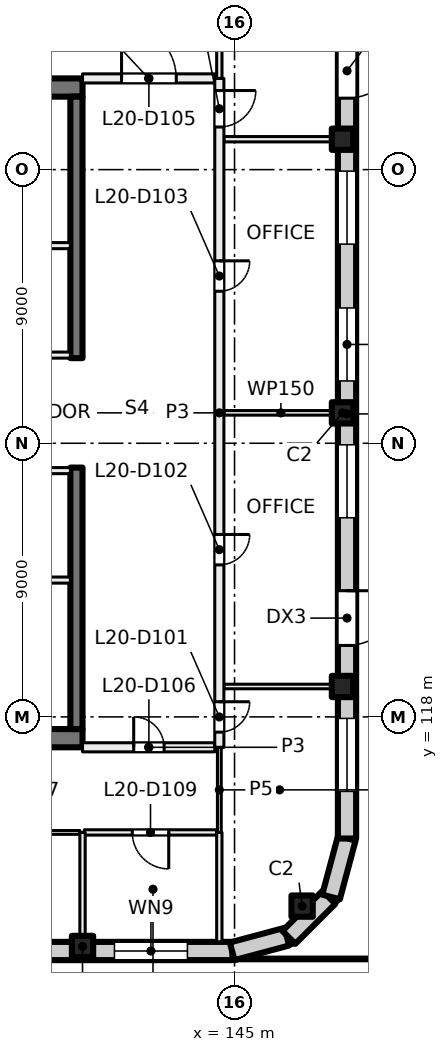
"""IFC4 building model, lengths in metres.
Left out: names, types, materials, properties, quantities, classifications, styles, units other than length and angle.
Written with IfcOpenShell. Run it as: python <this file> out.ifc"""

import sys

from ifc_helpers import new_model, si_unit, direction, frame, frame_2d, origin, origin_2d, place, context, subcontext, project, spatial, rectangle, extrude, element, fill, save


model = new_model("IFC4")
c1 = context("Model", 3, precision=1e-05, world=origin(), true_north=direction((0.0, 1.0)))
c2 = subcontext(c1, "Body", "Model", "MODEL_VIEW")
j1 = project(units=[si_unit("LENGTHUNIT", "METRE"), si_unit("PLANEANGLEUNIT", "RADIAN")], contexts=[c1])
p1 = place(None, origin())
s1 = spatial("IfcSite", under=j1, at=p1, CompositionType="ELEMENT")
p2 = place(p1, origin())
s2 = spatial("IfcBuilding", under=s1, at=p2, CompositionType="ELEMENT")
p3 = place(p2, frame((0.0, 0.0, 89.0)))
s3 = spatial("IfcBuildingStorey", under=s2, at=p3, CompositionType="ELEMENT", Elevation=89.0)
for number, where, z_axis, x_axis in (
    (1, (148.55, 119.0, 0.0), (0.0, 0.0, 1.0), (1.0, 0.0, 0.0)),
    (2, (148.55, 128.0, 0.0), (0.0, 0.0, 1.0), (1.0, 0.0, 0.0)),
    (3, (148.55, 137.0, 0.0), (0.0, 0.0, 1.0), (1.0, 0.0, 0.0)),
    (4, (140.0, 110.45, 0.0), (0.0, 0.0, 1.0), (1.0, 0.0, 0.0)),
    (5, (147.223, 111.777, 0.0), (0.0, 0.0, 1.0), (1.0, 0.0, 0.0)),
):
    element("IfcColumn", number, at=place(p3, frame(where, z_axis=z_axis, x_axis=x_axis)), inside=s3, PredefinedType="COLUMN", context=c2, shape_type="SweptSolid", body=[
        extrude(rectangle(XDim=0.7, YDim=0.7, at=origin_2d()), origin(), (0.0, 0.0, 1.0), 4.0),
    ])
for number, where, z_axis, x_axis in (
    (6, (135.4, 117.3, 0.0), (0.0, 0.0, 1.0), (1.0, 0.0, 0.0)),
    (7, (135.4, 138.7, 0.0), (0.0, 0.0, 1.0), (1.0, 0.0, 0.0)),
):
    element("IfcWall", number, at=place(p3, frame(where, z_axis=z_axis, x_axis=x_axis)), inside=s3, PredefinedType="SHEAR", context=c2, shape_type="SweptSolid", body=[
        extrude(rectangle(XDim=4.6, YDim=0.6, at=frame_2d((2.3, 0.0))), origin(), (0.0, 0.0, 1.0), 4.0),
    ])
for number, where, z_axis, x_axis in (
    (8, (139.8, 117.6, 0.0), (0.0, 0.0, 1.0), (0.0, 1.0, 0.0)),
    (9, (139.8, 129.8, 0.0), (0.0, 0.0, 1.0), (0.0, 1.0, 0.0)),
):
    element("IfcWall", number, at=place(p3, frame(where, z_axis=z_axis, x_axis=x_axis)), inside=s3, PredefinedType="SHEAR", context=c2, shape_type="SweptSolid", body=[
        extrude(rectangle(XDim=8.6, YDim=0.4, at=frame_2d((4.3, 0.0))), origin(), (0.0, 0.0, 1.0), 4.0),
    ])
p4 = place(p3, frame((144.93, 110.3, 0.0), z_axis=(0.0, 0.0, 1.0), x_axis=(-1.0, 0.0, 0.0)))
e10 = element("IfcWall", 10, at=p4, inside=s3, PredefinedType="SOLIDWALL", context=c2, shape_type="SweptSolid", body=[
    extrude(rectangle(XDim=13.93, YDim=0.6, at=frame_2d((6.965, 0.0))), origin(), (0.0, 0.0, 1.0), 3.625),
])
p5 = place(p4, frame((1.48, 0.0, 0.9)))
e11 = element("IfcOpeningElement", 11, at=p5, cuts=e10, PredefinedType="OPENING", context=c2, shape_type="SweptSolid", body=[
    extrude(rectangle(XDim=2.4, YDim=2.4, at=frame_2d((1.2, 1.2))), frame((0.0, 0.31, 0.0), z_axis=(0.0, -1.0, 0.0), x_axis=(1.0, 0.0, 0.0)), (0.0, 0.0, 1.0), 0.62),
])
p6 = place(p4, frame((5.98, 0.0, 0.9)))
e12 = element("IfcOpeningElement", 12, at=p6, cuts=e10, PredefinedType="OPENING", context=c2, shape_type="SweptSolid", body=[
    extrude(rectangle(XDim=2.4, YDim=2.4, at=frame_2d((1.2, 1.2))), frame((0.0, 0.31, 0.0), z_axis=(0.0, -1.0, 0.0), x_axis=(1.0, 0.0, 0.0)), (0.0, 0.0, 1.0), 0.62),
])
p7 = place(p4, frame((10.48, 0.0, 0.9)))
e13 = element("IfcOpeningElement", 13, at=p7, cuts=e10, PredefinedType="OPENING", context=c2, shape_type="SweptSolid", body=[
    extrude(rectangle(XDim=2.4, YDim=2.4, at=frame_2d((1.2, 1.2))), frame((0.0, 0.31, 0.0), z_axis=(0.0, -1.0, 0.0), x_axis=(1.0, 0.0, 0.0)), (0.0, 0.0, 1.0), 0.62),
])
for number, where, z_axis, x_axis in (
    (14, (146.719, 110.771, 0.0), (0.0, 0.0, 1.0), (-0.966, -0.259, 0.0)),
    (15, (148.104, 112.064, 0.0), (0.0, 0.0, 1.0), (-0.707, -0.707, 0.0)),
):
    element("IfcWall", number, at=place(p3, frame(where, z_axis=z_axis, x_axis=x_axis)), inside=s3, PredefinedType="SOLIDWALL", context=c2, shape_type="SweptSolid", body=[
        extrude(rectangle(XDim=1.861, YDim=0.6, at=frame_2d((0.93, 0.0))), origin(), (0.0, 0.0, 1.0), 3.625),
    ])
p8 = place(p3, frame((148.692, 114.01, 0.0), z_axis=(0.0, 0.0, 1.0), x_axis=(-0.258839784042, -0.965920269068, 0.0)))
e16 = element("IfcWall", 16, at=p8, inside=s3, PredefinedType="SOLIDWALL", context=c2, shape_type="SweptSolid", body=[
    extrude(rectangle(XDim=2.0, YDim=0.6, at=frame_2d((1.0, 0.0))), origin(), (0.0, 0.0, 1.0), 3.625),
])
p9 = place(p3, frame((148.7, 141.93, 0.0), z_axis=(0.0, 0.0, 1.0), x_axis=(0.0, -1.0, 0.0)))
e17 = element("IfcWall", 17, at=p9, inside=s3, PredefinedType="SOLIDWALL", context=c2, shape_type="SweptSolid", body=[
    extrude(rectangle(XDim=27.93, YDim=0.6, at=frame_2d((13.965, 0.0))), origin(), (0.0, 0.0, 1.0), 3.625),
])
p10 = place(p9, frame((1.78, 0.0, 0.0)))
e18 = element("IfcOpeningElement", 18, at=p10, cuts=e17, PredefinedType="OPENING", context=c2, shape_type="SweptSolid", body=[
    extrude(rectangle(XDim=1.8, YDim=2.4, at=frame_2d((0.9, 1.2))), frame((0.0, 0.31, 0.0), z_axis=(0.0, -1.0, 0.0), x_axis=(1.0, 0.0, 0.0)), (0.0, 0.0, 1.0), 0.62),
])
p11 = place(p9, frame((5.98, 0.0, 0.9)))
e19 = element("IfcOpeningElement", 19, at=p11, cuts=e17, PredefinedType="OPENING", context=c2, shape_type="SweptSolid", body=[
    extrude(rectangle(XDim=2.4, YDim=2.4, at=frame_2d((1.2, 1.2))), frame((0.0, 0.31, 0.0), z_axis=(0.0, -1.0, 0.0), x_axis=(1.0, 0.0, 0.0)), (0.0, 0.0, 1.0), 0.62),
])
p12 = place(p9, frame((10.48, 0.0, 0.9)))
e20 = element("IfcOpeningElement", 20, at=p12, cuts=e17, PredefinedType="OPENING", context=c2, shape_type="SweptSolid", body=[
    extrude(rectangle(XDim=2.4, YDim=2.4, at=frame_2d((1.2, 1.2))), frame((0.0, 0.31, 0.0), z_axis=(0.0, -1.0, 0.0), x_axis=(1.0, 0.0, 0.0)), (0.0, 0.0, 1.0), 0.62),
])
p13 = place(p9, frame((14.98, 0.0, 0.9)))
e21 = element("IfcOpeningElement", 21, at=p13, cuts=e17, PredefinedType="OPENING", context=c2, shape_type="SweptSolid", body=[
    extrude(rectangle(XDim=2.4, YDim=2.4, at=frame_2d((1.2, 1.2))), frame((0.0, 0.31, 0.0), z_axis=(0.0, -1.0, 0.0), x_axis=(1.0, 0.0, 0.0)), (0.0, 0.0, 1.0), 0.62),
])
p14 = place(p9, frame((19.78, 0.0, 0.0)))
e22 = element("IfcOpeningElement", 22, at=p14, cuts=e17, PredefinedType="OPENING", context=c2, shape_type="SweptSolid", body=[
    extrude(rectangle(XDim=1.8, YDim=2.4, at=frame_2d((0.9, 1.2))), frame((0.0, 0.31, 0.0), z_axis=(0.0, -1.0, 0.0), x_axis=(1.0, 0.0, 0.0)), (0.0, 0.0, 1.0), 0.62),
])
p15 = place(p9, frame((23.98, 0.0, 0.9)))
e23 = element("IfcOpeningElement", 23, at=p15, cuts=e17, PredefinedType="OPENING", context=c2, shape_type="SweptSolid", body=[
    extrude(rectangle(XDim=2.4, YDim=2.4, at=frame_2d((1.2, 1.2))), frame((0.0, 0.31, 0.0), z_axis=(0.0, -1.0, 0.0), x_axis=(1.0, 0.0, 0.0)), (0.0, 0.0, 1.0), 0.62),
])
p16 = place(p3, frame((135.0, 129.9, 0.0), z_axis=(0.0, 0.0, 1.0), x_axis=(1.0, 0.0, 0.0)))
e24 = element("IfcWall", 24, at=p16, inside=s3, PredefinedType="PARTITIONING", context=c2, shape_type="SweptSolid", body=[
    extrude(rectangle(XDim=4.6, YDim=0.2, at=frame_2d((2.3, 0.0))), origin(), (0.0, 0.0, 1.0), 3.625),
])
p17 = place(p16, frame((1.7, 0.0, 0.0)))
e25 = element("IfcOpeningElement", 25, at=p17, cuts=e24, PredefinedType="OPENING", context=c2, shape_type="SweptSolid", body=[
    extrude(rectangle(XDim=1.2, YDim=2.1, at=frame_2d((0.6, 1.05))), frame((0.0, 0.11, 0.0), z_axis=(0.0, -1.0, 0.0), x_axis=(1.0, 0.0, 0.0)), (0.0, 0.0, 1.0), 0.22),
])
p18 = place(p3, frame((135.0, 133.5, 0.0), z_axis=(0.0, 0.0, 1.0), x_axis=(1.0, 0.0, 0.0)))
e26 = element("IfcWall", 26, at=p18, inside=s3, PredefinedType="PARTITIONING", context=c2, shape_type="SweptSolid", body=[
    extrude(rectangle(XDim=4.6, YDim=0.2, at=frame_2d((2.3, 0.0))), origin(), (0.0, 0.0, 1.0), 3.625),
])
p19 = place(p18, frame((1.75, 0.0, 0.0)))
e27 = element("IfcOpeningElement", 27, at=p19, cuts=e26, PredefinedType="OPENING", context=c2, shape_type="SweptSolid", body=[
    extrude(rectangle(XDim=1.5, YDim=2.1, at=frame_2d((0.75, 1.05))), frame((0.0, 0.11, 0.0), z_axis=(0.0, -1.0, 0.0), x_axis=(1.0, 0.0, 0.0)), (0.0, 0.0, 1.0), 0.22),
])
p20 = place(p3, frame((139.6, 126.1, 0.0), z_axis=(0.0, 0.0, 1.0), x_axis=(-1.0, 0.0, 0.0)))
e28 = element("IfcWall", 28, at=p20, inside=s3, PredefinedType="PARTITIONING", context=c2, shape_type="SweptSolid", body=[
    extrude(rectangle(XDim=4.6, YDim=0.2, at=frame_2d((2.3, 0.0))), origin(), (0.0, 0.0, 1.0), 3.625),
])
p21 = place(p20, frame((1.7, 0.0, 0.0)))
e29 = element("IfcOpeningElement", 29, at=p21, cuts=e28, PredefinedType="OPENING", context=c2, shape_type="SweptSolid", body=[
    extrude(rectangle(XDim=1.2, YDim=2.1, at=frame_2d((0.6, 1.05))), frame((0.0, 0.11, 0.0), z_axis=(0.0, -1.0, 0.0), x_axis=(1.0, 0.0, 0.0)), (0.0, 0.0, 1.0), 0.22),
])
p22 = place(p3, frame((139.6, 122.5, 0.0), z_axis=(0.0, 0.0, 1.0), x_axis=(-1.0, 0.0, 0.0)))
e30 = element("IfcWall", 30, at=p22, inside=s3, PredefinedType="PARTITIONING", context=c2, shape_type="SweptSolid", body=[
    extrude(rectangle(XDim=4.6, YDim=0.2, at=frame_2d((2.3, 0.0))), origin(), (0.0, 0.0, 1.0), 3.625),
])
p23 = place(p22, frame((1.35, 0.0, 0.0)))
e31 = element("IfcOpeningElement", 31, at=p23, cuts=e30, PredefinedType="OPENING", context=c2, shape_type="SweptSolid", body=[
    extrude(rectangle(XDim=1.5, YDim=2.1, at=frame_2d((0.75, 1.05))), frame((0.0, 0.11, 0.0), z_axis=(0.0, -1.0, 0.0), x_axis=(1.0, 0.0, 0.0)), (0.0, 0.0, 1.0), 0.22),
])
p24 = place(p3, frame((139.916, 114.2, 0.0), z_axis=(0.0, 0.0, 1.0), x_axis=(-1.0, 0.0, 0.0)))
e32 = element("IfcWall", 32, at=p24, inside=s3, PredefinedType="PARTITIONING", context=c2, shape_type="SweptSolid", body=[
    extrude(rectangle(XDim=8.919, YDim=0.125, at=frame_2d((4.459, 0.0))), origin(), (0.0, 0.0, 1.0), 3.625),
])
p25 = place(p24, frame((1.698, 0.0, 0.0)))
e33 = element("IfcOpeningElement", 33, at=p25, cuts=e32, PredefinedType="OPENING", context=c2, shape_type="SweptSolid", body=[
    extrude(rectangle(XDim=1.0, YDim=2.1, at=frame_2d((0.5, 1.05))), frame((0.0, 0.073, 0.0), z_axis=(0.0, -1.0, 0.0), x_axis=(1.0, 0.0, 0.0)), (0.0, 0.0, 1.0), 0.145),
])
p26 = place(p24, frame((6.266, 0.0, 0.0)))
e34 = element("IfcOpeningElement", 34, at=p26, cuts=e32, PredefinedType="OPENING", context=c2, shape_type="SweptSolid", body=[
    extrude(rectangle(XDim=0.8, YDim=2.1, at=frame_2d((0.4, 1.05))), frame((0.0, 0.073, 0.0), z_axis=(0.0, -1.0, 0.0), x_axis=(1.0, 0.0, 0.0)), (0.0, 0.0, 1.0), 0.145),
])
p27 = place(p3, frame((144.412, 114.2, 0.0), z_axis=(0.0, 0.0, 1.0), x_axis=(-1.0, 0.0, 0.0)))
e35 = element("IfcWall", 35, at=p27, inside=s3, PredefinedType="PARTITIONING", context=c2, shape_type="SweptSolid", body=[
    extrude(rectangle(XDim=4.352, YDim=0.175, at=frame_2d((2.176, 0.0))), origin(), (0.0, 0.0, 1.0), 3.625),
])
p28 = place(p27, frame((1.576, 0.0, 0.0)))
e36 = element("IfcOpeningElement", 36, at=p28, cuts=e35, PredefinedType="OPENING", context=c2, shape_type="SweptSolid", body=[
    extrude(rectangle(XDim=1.2, YDim=2.1, at=frame_2d((0.6, 1.05))), frame((0.0, 0.097, 0.0), z_axis=(0.0, -1.0, 0.0), x_axis=(1.0, 0.0, 0.0)), (0.0, 0.0, 1.0), 0.195),
])
p29 = place(p3, frame((140.0, 110.6, 0.0), z_axis=(0.0, 0.0, 1.0), x_axis=(0.0, 1.0, 0.0)))
e37 = element("IfcWall", 37, at=p29, inside=s3, PredefinedType="PARTITIONING", context=c2, shape_type="SweptSolid", body=[
    extrude(rectangle(XDim=3.6, YDim=0.175, at=frame_2d((1.8, 0.0))), origin(), (0.0, 0.0, 1.0), 3.625),
])
p30 = place(p3, frame((140.0, 139.0, 0.0), z_axis=(0.0, 0.0, 1.0), x_axis=(1.0, 0.0, 0.0)))
e38 = element("IfcWall", 38, at=p30, inside=s3, PredefinedType="PARTITIONING", context=c2, shape_type="SweptSolid", body=[
    extrude(rectangle(XDim=4.35, YDim=0.3, at=frame_2d((2.175, 0.0))), origin(), (0.0, 0.0, 1.0), 3.625),
])
p31 = place(p30, frame((1.283, 0.0, 0.0)))
e39 = element("IfcOpeningElement", 39, at=p31, cuts=e38, PredefinedType="OPENING", context=c2, shape_type="SweptSolid", body=[
    extrude(rectangle(XDim=1.8, YDim=2.1, at=frame_2d((0.9, 1.05))), frame((0.0, 0.16, 0.0), z_axis=(0.0, -1.0, 0.0), x_axis=(1.0, 0.0, 0.0)), (0.0, 0.0, 1.0), 0.32),
])
p32 = place(p3, frame((144.5, 114.2, 0.0), z_axis=(0.0, 0.0, 1.0), x_axis=(0.0, -1.0, 0.0)))
e40 = element("IfcWall", 40, at=p32, inside=s3, PredefinedType="PARTITIONING", context=c2, shape_type="SweptSolid", body=[
    extrude(rectangle(XDim=3.6, YDim=0.175, at=frame_2d((1.8, 0.0))), origin(), (0.0, 0.0, 1.0), 3.625),
])
p33 = place(p3, frame((140.0, 117.0, 0.0), z_axis=(0.0, 0.0, 1.0), x_axis=(1.0, 0.0, 0.0)))
e41 = element("IfcWall", 41, at=p33, inside=s3, PredefinedType="PARTITIONING", context=c2, shape_type="SweptSolid", body=[
    extrude(rectangle(XDim=4.35, YDim=0.3, at=frame_2d((2.175, 0.0))), origin(), (0.0, 0.0, 1.0), 3.625),
])
p34 = place(p33, frame((1.684, 0.0, 0.0)))
e42 = element("IfcOpeningElement", 42, at=p34, cuts=e41, PredefinedType="OPENING", context=c2, shape_type="SweptSolid", body=[
    extrude(rectangle(XDim=1.0, YDim=2.1, at=frame_2d((0.5, 1.05))), frame((0.0, 0.16, 0.0), z_axis=(0.0, -1.0, 0.0), x_axis=(1.0, 0.0, 0.0)), (0.0, 0.0, 1.0), 0.32),
])
p35 = place(p3, frame((144.5, 117.0, 0.0), z_axis=(0.0, 0.0, 1.0), x_axis=(0.0, -1.0, 0.0)))
e43 = element("IfcWall", 43, at=p35, inside=s3, PredefinedType="PARTITIONING", context=c2, shape_type="SweptSolid", body=[
    extrude(rectangle(XDim=2.8, YDim=0.125, at=frame_2d((1.4, 0.0))), origin(), (0.0, 0.0, 1.0), 3.625),
])
for number, where, z_axis, x_axis in (
    (44, (144.65, 119.0, 0.0), (0.0, 0.0, 1.0), (1.0, 0.0, 0.0)),
    (45, (144.65, 128.0, 0.0), (0.0, 0.0, 1.0), (1.0, 0.0, 0.0)),
):
    element("IfcWall", number, at=place(p3, frame(where, z_axis=z_axis, x_axis=x_axis)), inside=s3, PredefinedType="PARTITIONING", context=c2, shape_type="SweptSolid", body=[
        extrude(rectangle(XDim=3.75, YDim=0.15, at=frame_2d((1.875, 0.0))), origin(), (0.0, 0.0, 1.0), 3.625),
    ])
p36 = place(p3, frame((144.65, 137.0, 0.0), z_axis=(0.0, 0.0, 1.0), x_axis=(1.0, 0.0, 0.0)))
e46 = element("IfcWall", 46, at=p36, inside=s3, PredefinedType="PARTITIONING", context=c2, shape_type="SweptSolid", body=[
    extrude(rectangle(XDim=3.75, YDim=0.175, at=frame_2d((1.875, 0.0))), origin(), (0.0, 0.0, 1.0), 3.625),
])
p37 = place(p3, frame((144.5, 139.0, 0.0), z_axis=(0.0, 0.0, 1.0), x_axis=(0.0, -1.0, 0.0)))
e47 = element("IfcWall", 47, at=p37, inside=s3, PredefinedType="PARTITIONING", context=c2, shape_type="SweptSolid", body=[
    extrude(rectangle(XDim=22.0, YDim=0.3, at=frame_2d((11.0, 0.0))), origin(), (0.0, 0.0, 1.0), 3.625),
])
p38 = place(p37, frame((20.501, 0.0, 0.0)))
e48 = element("IfcOpeningElement", 48, at=p38, cuts=e47, PredefinedType="OPENING", context=c2, shape_type="SweptSolid", body=[
    extrude(rectangle(XDim=1.0, YDim=2.1, at=frame_2d((0.5, 1.05))), frame((0.0, 0.16, 0.0), z_axis=(0.0, -1.0, 0.0), x_axis=(1.0, 0.0, 0.0)), (0.0, 0.0, 1.0), 0.32),
])
p39 = place(p37, frame((15.0, 0.0, 0.0)))
e49 = element("IfcOpeningElement", 49, at=p39, cuts=e47, PredefinedType="OPENING", context=c2, shape_type="SweptSolid", body=[
    extrude(rectangle(XDim=1.0, YDim=2.1, at=frame_2d((0.5, 1.05))), frame((0.0, 0.16, 0.0), z_axis=(0.0, -1.0, 0.0), x_axis=(1.0, 0.0, 0.0)), (0.0, 0.0, 1.0), 0.32),
])
p40 = place(p37, frame((6.0, 0.0, 0.0)))
e50 = element("IfcOpeningElement", 50, at=p40, cuts=e47, PredefinedType="OPENING", context=c2, shape_type="SweptSolid", body=[
    extrude(rectangle(XDim=1.0, YDim=2.1, at=frame_2d((0.5, 1.05))), frame((0.0, 0.16, 0.0), z_axis=(0.0, -1.0, 0.0), x_axis=(1.0, 0.0, 0.0)), (0.0, 0.0, 1.0), 0.32),
])
p41 = place(p37, frame((0.398, 0.0, 0.0)))
e51 = element("IfcOpeningElement", 51, at=p41, cuts=e47, PredefinedType="OPENING", context=c2, shape_type="SweptSolid", body=[
    extrude(rectangle(XDim=1.2, YDim=2.1, at=frame_2d((0.6, 1.05))), frame((0.0, 0.16, 0.0), z_axis=(0.0, -1.0, 0.0), x_axis=(1.0, 0.0, 0.0)), (0.0, 0.0, 1.0), 0.32),
])
p42 = place(p3, frame((144.5, 145.4, 0.0), z_axis=(0.0, 0.0, 1.0), x_axis=(0.0, -1.0, 0.0)))
e52 = element("IfcWall", 52, at=p42, inside=s3, PredefinedType="PARTITIONING", context=c2, shape_type="SweptSolid", body=[
    extrude(rectangle(XDim=6.4, YDim=0.175, at=frame_2d((3.2, 0.0))), origin(), (0.0, 0.0, 1.0), 3.625),
])
p43 = place(p5, origin())
e53 = element("IfcWindow", 53, at=p43, inside=s3, PartitioningType="SINGLE_PANEL", PredefinedType="WINDOW", context=c2, shape_type="SweptSolid", body=[
    extrude(rectangle(XDim=2.4, YDim=2.4, at=frame_2d((1.2, 1.2))), frame((0.0, 0.03, 0.0), z_axis=(0.0, -1.0, 0.0), x_axis=(1.0, 0.0, 0.0)), (0.0, 0.0, 1.0), 0.06),
])
fill(e11, e53)
p44 = place(p10, origin())
e54 = element("IfcDoor", 54, at=p44, inside=s3, OperationType="DOUBLE_DOOR_SINGLE_SWING", PredefinedType="DOOR", context=c2, shape_type="SweptSolid", body=[
    extrude(rectangle(XDim=1.8, YDim=2.4, at=frame_2d((0.9, 1.2))), frame((0.0, 0.025, 0.0), z_axis=(0.0, -1.0, 0.0), x_axis=(1.0, 0.0, 0.0)), (0.0, 0.0, 1.0), 0.05),
])
fill(e18, e54)
p45 = place(p11, origin())
e55 = element("IfcWindow", 55, at=p45, inside=s3, PartitioningType="SINGLE_PANEL", PredefinedType="WINDOW", context=c2, shape_type="SweptSolid", body=[
    extrude(rectangle(XDim=2.4, YDim=2.4, at=frame_2d((1.2, 1.2))), frame((0.0, 0.03, 0.0), z_axis=(0.0, -1.0, 0.0), x_axis=(1.0, 0.0, 0.0)), (0.0, 0.0, 1.0), 0.06),
])
fill(e19, e55)
p46 = place(p12, origin())
e56 = element("IfcWindow", 56, at=p46, inside=s3, PartitioningType="SINGLE_PANEL", PredefinedType="WINDOW", context=c2, shape_type="SweptSolid", body=[
    extrude(rectangle(XDim=2.4, YDim=2.4, at=frame_2d((1.2, 1.2))), frame((0.0, 0.03, 0.0), z_axis=(0.0, -1.0, 0.0), x_axis=(1.0, 0.0, 0.0)), (0.0, 0.0, 1.0), 0.06),
])
fill(e20, e56)
p47 = place(p13, origin())
e57 = element("IfcWindow", 57, at=p47, inside=s3, PartitioningType="SINGLE_PANEL", PredefinedType="WINDOW", context=c2, shape_type="SweptSolid", body=[
    extrude(rectangle(XDim=2.4, YDim=2.4, at=frame_2d((1.2, 1.2))), frame((0.0, 0.03, 0.0), z_axis=(0.0, -1.0, 0.0), x_axis=(1.0, 0.0, 0.0)), (0.0, 0.0, 1.0), 0.06),
])
fill(e21, e57)
p48 = place(p14, origin())
e58 = element("IfcDoor", 58, at=p48, inside=s3, OperationType="DOUBLE_DOOR_SINGLE_SWING", PredefinedType="DOOR", context=c2, shape_type="SweptSolid", body=[
    extrude(rectangle(XDim=1.8, YDim=2.4, at=frame_2d((0.9, 1.2))), frame((0.0, 0.025, 0.0), z_axis=(0.0, -1.0, 0.0), x_axis=(1.0, 0.0, 0.0)), (0.0, 0.0, 1.0), 0.05),
])
fill(e22, e58)
p49 = place(p15, origin())
e59 = element("IfcWindow", 59, at=p49, inside=s3, PartitioningType="SINGLE_PANEL", PredefinedType="WINDOW", context=c2, shape_type="SweptSolid", body=[
    extrude(rectangle(XDim=2.4, YDim=2.4, at=frame_2d((1.2, 1.2))), frame((0.0, 0.03, 0.0), z_axis=(0.0, -1.0, 0.0), x_axis=(1.0, 0.0, 0.0)), (0.0, 0.0, 1.0), 0.06),
])
fill(e23, e59)
p50 = place(p38, origin())
e60 = element("IfcDoor", 60, at=p50, inside=s3, OperationType="SINGLE_SWING_LEFT", PredefinedType="DOOR", context=c2, shape_type="SweptSolid", body=[
    extrude(rectangle(XDim=1.0, YDim=2.1, at=frame_2d((0.5, 1.05))), frame((0.0, 0.025, 0.0), z_axis=(0.0, -1.0, 0.0), x_axis=(1.0, 0.0, 0.0)), (0.0, 0.0, 1.0), 0.05),
])
fill(e48, e60)
p51 = place(p39, origin())
e61 = element("IfcDoor", 61, at=p51, inside=s3, OperationType="SINGLE_SWING_LEFT", PredefinedType="DOOR", context=c2, shape_type="SweptSolid", body=[
    extrude(rectangle(XDim=1.0, YDim=2.1, at=frame_2d((0.5, 1.05))), frame((0.0, 0.025, 0.0), z_axis=(0.0, -1.0, 0.0), x_axis=(1.0, 0.0, 0.0)), (0.0, 0.0, 1.0), 0.05),
])
fill(e49, e61)
p52 = place(p40, origin())
e62 = element("IfcDoor", 62, at=p52, inside=s3, OperationType="SINGLE_SWING_LEFT", PredefinedType="DOOR", context=c2, shape_type="SweptSolid", body=[
    extrude(rectangle(XDim=1.0, YDim=2.1, at=frame_2d((0.5, 1.05))), frame((0.0, 0.025, 0.0), z_axis=(0.0, -1.0, 0.0), x_axis=(1.0, 0.0, 0.0)), (0.0, 0.0, 1.0), 0.05),
])
fill(e50, e62)
p53 = place(p41, origin())
e63 = element("IfcDoor", 63, at=p53, inside=s3, OperationType="DOUBLE_DOOR_SINGLE_SWING", PredefinedType="DOOR", context=c2, shape_type="SweptSolid", body=[
    extrude(rectangle(XDim=1.2, YDim=2.1, at=frame_2d((0.6, 1.05))), frame((0.0, 0.025, 0.0), z_axis=(0.0, -1.0, 0.0), x_axis=(1.0, 0.0, 0.0)), (0.0, 0.0, 1.0), 0.05),
])
fill(e51, e63)
p54 = place(p31, origin())
e64 = element("IfcDoor", 64, at=p54, inside=s3, OperationType="DOUBLE_DOOR_SINGLE_SWING", PredefinedType="DOOR", context=c2, shape_type="SweptSolid", body=[
    extrude(rectangle(XDim=1.8, YDim=2.1, at=frame_2d((0.9, 1.05))), frame((0.0, 0.025, 0.0), z_axis=(0.0, -1.0, 0.0), x_axis=(1.0, 0.0, 0.0)), (0.0, 0.0, 1.0), 0.05),
])
fill(e39, e64)
p55 = place(p34, origin())
e65 = element("IfcDoor", 65, at=p55, inside=s3, OperationType="SINGLE_SWING_LEFT", PredefinedType="DOOR", context=c2, shape_type="SweptSolid", body=[
    extrude(rectangle(XDim=1.0, YDim=2.1, at=frame_2d((0.5, 1.05))), frame((0.0, 0.025, 0.0), z_axis=(0.0, -1.0, 0.0), x_axis=(1.0, 0.0, 0.0)), (0.0, 0.0, 1.0), 0.05),
])
fill(e42, e65)
p56 = place(p28, origin())
e66 = element("IfcDoor", 66, at=p56, inside=s3, OperationType="DOUBLE_DOOR_SINGLE_SWING", PredefinedType="DOOR", context=c2, shape_type="SweptSolid", body=[
    extrude(rectangle(XDim=1.2, YDim=2.1, at=frame_2d((0.6, 1.05))), frame((0.0, 0.025, 0.0), z_axis=(0.0, -1.0, 0.0), x_axis=(1.0, 0.0, 0.0)), (0.0, 0.0, 1.0), 0.05),
])
fill(e36, e66)
save(model, sys.argv[1])
